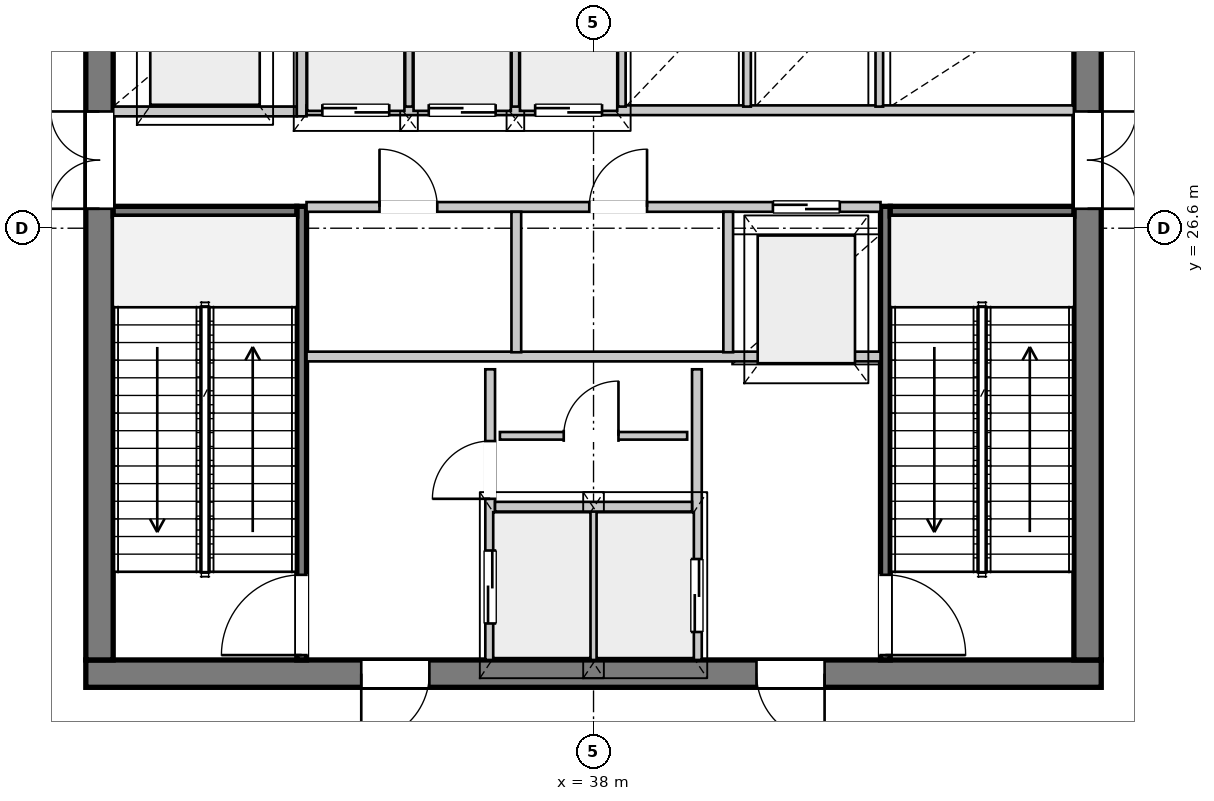
"""IFC4 building model, lengths in metres.
Left out: names, types, materials, properties, quantities, classifications, styles, units other than length and angle.
Written with IfcOpenShell. Run it as: python <this file> out.ifc"""

import sys

from ifc_helpers import new_model, si_unit, direction, frame, frame_2d, origin, place, context, subcontext, project, spatial, rectangle, extrude, source, transform, mapped, element, fill, save


model = new_model("IFC4")
c1 = context("Model", 3, precision=1e-05, world=origin(), true_north=direction((0.0, 1.0)))
c2 = subcontext(c1, "Body", "Model", "MODEL_VIEW")
j1 = project(units=[si_unit("LENGTHUNIT", "METRE"), si_unit("PLANEANGLEUNIT", "RADIAN")], contexts=[c1])
p1 = place(None, origin())
s1 = spatial("IfcSite", under=j1, at=p1, CompositionType="ELEMENT")
p2 = place(p1, origin())
s2 = spatial("IfcBuilding", under=s1, at=p2, CompositionType="ELEMENT")
p3 = place(p2, frame((0.0, 0.0, 204.3)))
s3 = spatial("IfcBuildingStorey", under=s2, at=p3, CompositionType="ELEMENT", Elevation=204.3)
p4 = place(p3, frame((52.952, 22.917, 0.0), z_axis=(0.0, 0.0, 1.0), x_axis=(-0.51363254846, -0.858010259357, 0.0)))
e1 = element("IfcWall", 1, at=p4, inside=s3, PredefinedType="SOLIDWALL", context=c2, shape_type="SweptSolid", body=[
    extrude(rectangle(XDim=23.133, YDim=0.38, at=frame_2d((11.566, 0.0))), origin(), (0.0, 0.0, 1.0), 4.572),
])
p5 = place(p3, frame((46.35, 19.275, 0.0), z_axis=(0.0, 0.0, 1.0), x_axis=(-1.0, 0.0, 0.0)))
e2 = element("IfcWall", 2, at=p5, inside=s3, PredefinedType="SHEAR", context=c2, shape_type="SweptSolid", body=[
    extrude(rectangle(XDim=16.7, YDim=0.45, at=frame_2d((8.35, 0.0))), origin(), (0.0, 0.0, 1.0), 5.08),
])
p6 = place(p5, frame((4.55, 0.0, 0.0)))
e3 = element("IfcOpeningElement", 3, at=p6, cuts=e2, PredefinedType="OPENING", context=c2, shape_type="SweptSolid", body=[
    extrude(rectangle(XDim=1.12, YDim=2.25, at=frame_2d((0.56, 1.125))), frame((0.0, 0.235, 0.0), z_axis=(0.0, -1.0, 0.0), x_axis=(1.0, 0.0, 0.0)), (0.0, 0.0, 1.0), 0.47),
])
p7 = place(p5, frame((11.05, 0.0, 0.0)))
e4 = element("IfcOpeningElement", 4, at=p7, cuts=e2, PredefinedType="OPENING", context=c2, shape_type="SweptSolid", body=[
    extrude(rectangle(XDim=1.12, YDim=2.25, at=frame_2d((0.56, 1.125))), frame((0.0, 0.235, 0.0), z_axis=(0.0, -1.0, 0.0), x_axis=(1.0, 0.0, 0.0)), (0.0, 0.0, 1.0), 0.47),
])
p8 = place(p3, frame((29.875, 19.5, 0.0), z_axis=(0.0, 0.0, 1.0), x_axis=(0.0, 1.0, 0.0)))
e5 = element("IfcWall", 5, at=p8, inside=s3, PredefinedType="SHEAR", context=c2, shape_type="SweptSolid", body=[
    extrude(rectangle(XDim=14.2, YDim=0.45, at=frame_2d((7.1, 0.0))), origin(), (0.0, 0.0, 1.0), 5.08),
])
p9 = place(p8, frame((7.42, 0.0, 0.0)))
e6 = element("IfcOpeningElement", 6, at=p9, cuts=e5, PredefinedType="OPENING", context=c2, shape_type="SweptSolid", body=[
    extrude(rectangle(XDim=1.6, YDim=2.2, at=frame_2d((0.8, 1.1))), frame((0.0, 0.235, 0.0), z_axis=(0.0, -1.0, 0.0), x_axis=(1.0, 0.0, 0.0)), (0.0, 0.0, 1.0), 0.47),
])
p10 = place(p3, frame((46.125, 33.7, 0.0), z_axis=(0.0, 0.0, 1.0), x_axis=(0.0, -1.0, 0.0)))
e7 = element("IfcWall", 7, at=p10, inside=s3, PredefinedType="SHEAR", context=c2, shape_type="SweptSolid", body=[
    extrude(rectangle(XDim=14.2, YDim=0.45, at=frame_2d((7.1, 0.0))), origin(), (0.0, 0.0, 1.0), 5.08),
])
p11 = place(p10, frame((5.18, 0.0, 0.0)))
e8 = element("IfcOpeningElement", 8, at=p11, cuts=e7, PredefinedType="OPENING", context=c2, shape_type="SweptSolid", body=[
    extrude(rectangle(XDim=1.6, YDim=2.2, at=frame_2d((0.8, 1.1))), frame((0.0, 0.235, 0.0), z_axis=(0.0, -1.0, 0.0), x_axis=(1.0, 0.0, 0.0)), (0.0, 0.0, 1.0), 0.47),
])
p12 = place(p10, frame((2.05, 0.0, 0.0)))
e9 = element("IfcOpeningElement", 9, at=p12, cuts=e7, PredefinedType="OPENING", context=c2, shape_type="SweptSolid", body=[
    extrude(rectangle(XDim=0.95, YDim=2.1, at=frame_2d((0.475, 1.05))), frame((0.0, 0.235, 0.0), z_axis=(0.0, -1.0, 0.0), x_axis=(1.0, 0.0, 0.0)), (0.0, 0.0, 1.0), 0.47),
])
p13 = place(p3, frame((33.2, 19.5, 0.0), z_axis=(0.0, 0.0, 1.0), x_axis=(0.0, 1.0, 0.0)))
e10 = element("IfcWall", 10, at=p13, inside=s3, PredefinedType="PARTITIONING", context=c2, shape_type="SweptSolid", body=[
    extrude(rectangle(XDim=7.46, YDim=0.16, at=frame_2d((3.73, 0.0))), origin(), (0.0, 0.0, 1.0), 5.08),
])
p14 = place(p13, frame((0.08, 0.0, 0.0)))
e11 = element("IfcOpeningElement", 11, at=p14, cuts=e10, PredefinedType="OPENING", context=c2, shape_type="SweptSolid", body=[
    extrude(rectangle(XDim=1.32, YDim=2.2, at=frame_2d((0.66, 1.1))), frame((0.0, 0.09, 0.0), z_axis=(0.0, -1.0, 0.0), x_axis=(1.0, 0.0, 0.0)), (0.0, 0.0, 1.0), 0.18),
])
p15 = place(p3, frame((30.1, 26.88, 0.0), z_axis=(0.0, 0.0, 1.0), x_axis=(1.0, 0.0, 0.0)))
e12 = element("IfcWall", 12, at=p15, inside=s3, PredefinedType="PARTITIONING", context=c2, shape_type="SweptSolid", body=[
    extrude(rectangle(XDim=3.02, YDim=0.16, at=frame_2d((1.51, 0.0))), origin(), (0.0, 0.0, 1.0), 5.08),
])
p16 = place(p3, frame((42.8, 26.96, 0.0), z_axis=(0.0, 0.0, 1.0), x_axis=(0.0, -1.0, 0.0)))
e13 = element("IfcWall", 13, at=p16, inside=s3, PredefinedType="PARTITIONING", context=c2, shape_type="SweptSolid", body=[
    extrude(rectangle(XDim=7.46, YDim=0.16, at=frame_2d((3.73, 0.0))), origin(), (0.0, 0.0, 1.0), 5.08),
])
p17 = place(p16, frame((6.06, 0.0, 0.0)))
e14 = element("IfcOpeningElement", 14, at=p17, cuts=e13, PredefinedType="OPENING", context=c2, shape_type="SweptSolid", body=[
    extrude(rectangle(XDim=1.32, YDim=2.2, at=frame_2d((0.66, 1.1))), frame((0.0, 0.09, 0.0), z_axis=(0.0, -1.0, 0.0), x_axis=(1.0, 0.0, 0.0)), (0.0, 0.0, 1.0), 0.18),
])
p18 = place(p3, frame((42.88, 26.88, 0.0), z_axis=(0.0, 0.0, 1.0), x_axis=(1.0, 0.0, 0.0)))
e15 = element("IfcWall", 15, at=p18, inside=s3, PredefinedType="PARTITIONING", context=c2, shape_type="SweptSolid", body=[
    extrude(rectangle(XDim=3.02, YDim=0.16, at=frame_2d((1.51, 0.0))), origin(), (0.0, 0.0, 1.0), 5.08),
])
p19 = place(p3, frame((36.3, 19.5, 0.0), z_axis=(0.0, 0.0, 1.0), x_axis=(0.0, 1.0, 0.0)))
e16 = element("IfcWall", 16, at=p19, inside=s3, PredefinedType="PARTITIONING", context=c2, shape_type="SweptSolid", body=[
    extrude(rectangle(XDim=4.78, YDim=0.16, at=frame_2d((2.39, 0.0))), origin(), (0.0, 0.0, 1.0), 5.08),
])
p20 = place(p19, frame((0.6, 0.0, 0.0)))
e17 = element("IfcOpeningElement", 17, at=p20, cuts=e16, PredefinedType="OPENING", context=c2, shape_type="SweptSolid", body=[
    extrude(rectangle(XDim=1.2, YDim=2.2, at=frame_2d((0.6, 1.1))), frame((0.0, 0.09, 0.0), z_axis=(0.0, -1.0, 0.0), x_axis=(1.0, 0.0, 0.0)), (0.0, 0.0, 1.0), 0.18),
])
p21 = place(p19, frame((2.65, 0.0, 0.0)))
e18 = element("IfcOpeningElement", 18, at=p21, cuts=e16, PredefinedType="OPENING", context=c2, shape_type="SweptSolid", body=[
    extrude(rectangle(XDim=0.95, YDim=2.1, at=frame_2d((0.475, 1.05))), frame((0.0, 0.09, 0.0), z_axis=(0.0, -1.0, 0.0), x_axis=(1.0, 0.0, 0.0)), (0.0, 0.0, 1.0), 0.18),
])
p22 = place(p3, frame((39.7, 24.28, 0.0), z_axis=(0.0, 0.0, 1.0), x_axis=(0.0, -1.0, 0.0)))
e19 = element("IfcWall", 19, at=p22, inside=s3, PredefinedType="PARTITIONING", context=c2, shape_type="SweptSolid", body=[
    extrude(rectangle(XDim=4.78, YDim=0.16, at=frame_2d((2.39, 0.0))), origin(), (0.0, 0.0, 1.0), 5.08),
])
p23 = place(p22, frame((3.12, 0.0, 0.0)))
e20 = element("IfcOpeningElement", 20, at=p23, cuts=e19, PredefinedType="OPENING", context=c2, shape_type="SweptSolid", body=[
    extrude(rectangle(XDim=1.2, YDim=2.2, at=frame_2d((0.6, 1.1))), frame((0.0, 0.09, 0.0), z_axis=(0.0, -1.0, 0.0), x_axis=(1.0, 0.0, 0.0)), (0.0, 0.0, 1.0), 0.18),
])
p24 = place(p3, frame((38.0, 19.5, 0.0), z_axis=(0.0, 0.0, 1.0), x_axis=(0.0, 1.0, 0.0)))
e21 = element("IfcWall", 21, at=p24, inside=s3, PredefinedType="PARTITIONING", context=c2, shape_type="SweptSolid", body=[
    extrude(rectangle(XDim=2.46, YDim=0.125, at=frame_2d((1.23, 0.0))), origin(), (0.0, 0.0, 1.0), 5.08),
])
p25 = place(p3, frame((36.38, 22.02, 0.0), z_axis=(0.0, 0.0, 1.0), x_axis=(1.0, 0.0, 0.0)))
e22 = element("IfcWall", 22, at=p25, inside=s3, PredefinedType="PARTITIONING", context=c2, shape_type="SweptSolid", body=[
    extrude(rectangle(XDim=3.24, YDim=0.16, at=frame_2d((1.62, 0.0))), origin(), (0.0, 0.0, 1.0), 5.08),
])
p26 = place(p3, frame((33.28, 24.49, 0.0), z_axis=(0.0, 0.0, 1.0), x_axis=(1.0, 0.0, 0.0)))
e23 = element("IfcWall", 23, at=p26, inside=s3, PredefinedType="PARTITIONING", context=c2, shape_type="SweptSolid", body=[
    extrude(rectangle(XDim=9.44, YDim=0.16, at=frame_2d((4.72, 0.0))), origin(), (0.0, 0.0, 1.0), 5.08),
])
p27 = place(p3, frame((36.46, 23.186, 0.0), z_axis=(0.0, 0.0, 1.0), x_axis=(1.0, 0.0, 0.0)))
e24 = element("IfcWall", 24, at=p27, inside=s3, PredefinedType="PARTITIONING", context=c2, shape_type="SweptSolid", body=[
    extrude(rectangle(XDim=3.08, YDim=0.125, at=frame_2d((1.54, 0.0))), origin(), (0.0, 0.0, 1.0), 5.08),
])
p28 = place(p27, frame((1.05, 0.0, 0.0)))
e25 = element("IfcOpeningElement", 25, at=p28, cuts=e24, PredefinedType="OPENING", context=c2, shape_type="SweptSolid", body=[
    extrude(rectangle(XDim=0.9, YDim=2.1, at=frame_2d((0.45, 1.05))), frame((0.0, 0.073, 0.0), z_axis=(0.0, -1.0, 0.0), x_axis=(1.0, 0.0, 0.0)), (0.0, 0.0, 1.0), 0.145),
])
p29 = place(p3, frame((30.1, 28.52, 0.0), z_axis=(0.0, 0.0, 1.0), x_axis=(1.0, 0.0, 0.0)))
e26 = element("IfcWall", 26, at=p29, inside=s3, PredefinedType="PARTITIONING", context=c2, shape_type="SweptSolid", body=[
    extrude(rectangle(XDim=3.02, YDim=0.16, at=frame_2d((1.51, 0.0))), origin(), (0.0, 0.0, 1.0), 5.08),
])
p30 = place(p3, frame((33.2, 28.44, 0.0), z_axis=(0.0, 0.0, 1.0), x_axis=(0.0, 1.0, 0.0)))
e27 = element("IfcWall", 27, at=p30, inside=s3, PredefinedType="PARTITIONING", context=c2, shape_type="SweptSolid", body=[
    extrude(rectangle(XDim=5.26, YDim=0.16, at=frame_2d((2.63, 0.0))), origin(), (0.0, 0.0, 1.0), 5.08),
])
p31 = place(p3, frame((33.28, 26.95, 0.0), z_axis=(0.0, 0.0, 1.0), x_axis=(1.0, 0.0, 0.0)))
e28 = element("IfcWall", 28, at=p31, inside=s3, PredefinedType="PARTITIONING", context=c2, shape_type="SweptSolid", body=[
    extrude(rectangle(XDim=9.44, YDim=0.16, at=frame_2d((4.72, 0.0))), origin(), (0.0, 0.0, 1.0), 5.08),
])
p32 = place(p31, frame((1.2, 0.0, 0.0)))
e29 = element("IfcOpeningElement", 29, at=p32, cuts=e28, PredefinedType="OPENING", context=c2, shape_type="SweptSolid", body=[
    extrude(rectangle(XDim=0.95, YDim=2.1, at=frame_2d((0.475, 1.05))), frame((0.0, 0.09, 0.0), z_axis=(0.0, -1.0, 0.0), x_axis=(1.0, 0.0, 0.0)), (0.0, 0.0, 1.0), 0.18),
])
p33 = place(p31, frame((4.65, 0.0, 0.0)))
e30 = element("IfcOpeningElement", 30, at=p33, cuts=e28, PredefinedType="OPENING", context=c2, shape_type="SweptSolid", body=[
    extrude(rectangle(XDim=0.95, YDim=2.1, at=frame_2d((0.475, 1.05))), frame((0.0, 0.09, 0.0), z_axis=(0.0, -1.0, 0.0), x_axis=(1.0, 0.0, 0.0)), (0.0, 0.0, 1.0), 0.18),
])
p34 = place(p31, frame((7.67, 0.0, 0.0)))
e31 = element("IfcOpeningElement", 31, at=p34, cuts=e28, PredefinedType="OPENING", context=c2, shape_type="SweptSolid", body=[
    extrude(rectangle(XDim=1.1, YDim=2.2, at=frame_2d((0.55, 1.1))), frame((0.0, 0.09, 0.0), z_axis=(0.0, -1.0, 0.0), x_axis=(1.0, 0.0, 0.0)), (0.0, 0.0, 1.0), 0.18),
])
for number, where, z_axis, x_axis in (
    (32, (36.73, 24.56, 0.0), (0.0, 0.0, 1.0), (0.0, 1.0, 0.0)),
    (33, (40.215, 24.56, 0.0), (0.0, 0.0, 1.0), (0.0, 1.0, 0.0)),
):
    element("IfcWall", number, at=place(p3, frame(where, z_axis=z_axis, x_axis=x_axis)), inside=s3, PredefinedType="PARTITIONING", context=c2, shape_type="SweptSolid", body=[
        extrude(rectangle(XDim=2.31, YDim=0.16, at=frame_2d((1.155, 0.0))), origin(), (0.0, 0.0, 1.0), 5.08),
    ])
p35 = place(p3, frame((33.28, 28.54, 0.0), z_axis=(0.0, 0.0, 1.0), x_axis=(1.0, 0.0, 0.0)))
e34 = element("IfcWall", 34, at=p35, inside=s3, PredefinedType="PARTITIONING", context=c2, shape_type="SweptSolid", body=[
    extrude(rectangle(XDim=12.62, YDim=0.16, at=frame_2d((6.31, 0.0))), origin(), (0.0, 0.0, 1.0), 5.08),
])
p36 = place(p35, frame((0.26, 0.0, 0.0)))
e35 = element("IfcOpeningElement", 35, at=p36, cuts=e34, PredefinedType="OPENING", context=c2, shape_type="SweptSolid", body=[
    extrude(rectangle(XDim=1.1, YDim=2.2, at=frame_2d((0.55, 1.1))), frame((0.0, 0.09, 0.0), z_axis=(0.0, -1.0, 0.0), x_axis=(1.0, 0.0, 0.0)), (0.0, 0.0, 1.0), 0.18),
])
p37 = place(p35, frame((2.01, 0.0, 0.0)))
e36 = element("IfcOpeningElement", 36, at=p37, cuts=e34, PredefinedType="OPENING", context=c2, shape_type="SweptSolid", body=[
    extrude(rectangle(XDim=1.1, YDim=2.2, at=frame_2d((0.55, 1.1))), frame((0.0, 0.09, 0.0), z_axis=(0.0, -1.0, 0.0), x_axis=(1.0, 0.0, 0.0)), (0.0, 0.0, 1.0), 0.18),
])
p38 = place(p35, frame((3.76, 0.0, 0.0)))
e37 = element("IfcOpeningElement", 37, at=p38, cuts=e34, PredefinedType="OPENING", context=c2, shape_type="SweptSolid", body=[
    extrude(rectangle(XDim=1.1, YDim=2.2, at=frame_2d((0.55, 1.1))), frame((0.0, 0.09, 0.0), z_axis=(0.0, -1.0, 0.0), x_axis=(1.0, 0.0, 0.0)), (0.0, 0.0, 1.0), 0.18),
])
for number, where, z_axis, x_axis in (
    (38, (34.965, 28.6, 0.0), (0.0, 0.0, 1.0), (0.0, 1.0, 0.0)),
    (39, (36.715, 28.6, 0.0), (0.0, 0.0, 1.0), (0.0, 1.0, 0.0)),
    (40, (38.465, 28.6, 0.0), (0.0, 0.0, 1.0), (0.0, 1.0, 0.0)),
    (41, (40.525, 28.6, 0.0), (0.0, 0.0, 1.0), (0.0, 1.0, 0.0)),
    (42, (42.7, 28.6, 0.0), (0.0, 0.0, 1.0), (0.0, 1.0, 0.0)),
):
    element("IfcWall", number, at=place(p3, frame(where, z_axis=z_axis, x_axis=x_axis)), inside=s3, PredefinedType="PARTITIONING", context=c2, shape_type="SweptSolid", body=[
        extrude(rectangle(XDim=1.92, YDim=0.125, at=frame_2d((0.96, 0.0))), origin(), (0.0, 0.0, 1.0), 5.08),
    ])
m1 = source(origin(), c2, "Body", "SweptSolid", [
    extrude(rectangle(XDim=1.12, YDim=2.25, at=frame_2d((0.56, 1.125))), frame((0.0, 0.025, 0.0), z_axis=(0.0, -1.0, 0.0), x_axis=(1.0, 0.0, 0.0)), (0.0, 0.0, 1.0), 0.05),
])
p39 = place(p6, origin())
e43 = element("IfcDoor", 43, at=p39, inside=s3, OperationType="SINGLE_SWING_LEFT", PredefinedType="DOOR", context=c2, shape_type="MappedRepresentation", body=[
    mapped(m1, transform((0.0, 0.0, 0.0), x_axis=(1.0, 0.0, 0.0), y_axis=(0.0, 1.0, 0.0), z_axis=(0.0, 0.0, 1.0), scale=1.0)),
])
fill(e3, e43)
p40 = place(p7, origin())
e44 = element("IfcDoor", 44, at=p40, inside=s3, OperationType="SINGLE_SWING_RIGHT", PredefinedType="DOOR", context=c2, shape_type="MappedRepresentation", body=[
    mapped(m1, transform((0.0, 0.0, 0.0), x_axis=(1.0, 0.0, 0.0), y_axis=(0.0, 1.0, 0.0), z_axis=(0.0, 0.0, 1.0), scale=1.0)),
])
fill(e4, e44)
m2 = source(origin(), c2, "Body", "SweptSolid", [
    extrude(rectangle(XDim=1.6, YDim=2.2, at=frame_2d((0.8, 1.1))), frame((0.0, 0.025, 0.0), z_axis=(0.0, -1.0, 0.0), x_axis=(1.0, 0.0, 0.0)), (0.0, 0.0, 1.0), 0.05),
])
p41 = place(p9, origin())
e45 = element("IfcDoor", 45, at=p41, inside=s3, OperationType="DOUBLE_DOOR_SINGLE_SWING", PredefinedType="DOOR", context=c2, shape_type="MappedRepresentation", body=[
    mapped(m2, transform((0.0, 0.0, 0.0), x_axis=(1.0, 0.0, 0.0), y_axis=(0.0, 1.0, 0.0), z_axis=(0.0, 0.0, 1.0), scale=1.0)),
])
fill(e6, e45)
p42 = place(p11, origin())
e46 = element("IfcDoor", 46, at=p42, inside=s3, OperationType="DOUBLE_DOOR_SINGLE_SWING", PredefinedType="DOOR", context=c2, shape_type="MappedRepresentation", body=[
    mapped(m2, transform((0.0, 0.0, 0.0), x_axis=(1.0, 0.0, 0.0), y_axis=(0.0, 1.0, 0.0), z_axis=(0.0, 0.0, 1.0), scale=1.0)),
])
fill(e8, e46)
m3 = source(origin(), c2, "Body", "SweptSolid", [
    extrude(rectangle(XDim=1.32, YDim=2.2, at=frame_2d((0.66, 1.1))), frame((0.0, 0.025, 0.0), z_axis=(0.0, -1.0, 0.0), x_axis=(1.0, 0.0, 0.0)), (0.0, 0.0, 1.0), 0.05),
])
p43 = place(p14, origin())
e47 = element("IfcDoor", 47, at=p43, inside=s3, OperationType="SINGLE_SWING_LEFT", PredefinedType="DOOR", context=c2, shape_type="MappedRepresentation", body=[
    mapped(m3, transform((0.0, 0.0, 0.0), x_axis=(1.0, 0.0, 0.0), y_axis=(0.0, 1.0, 0.0), z_axis=(0.0, 0.0, 1.0), scale=1.0)),
])
fill(e11, e47)
p44 = place(p17, origin())
e48 = element("IfcDoor", 48, at=p44, inside=s3, OperationType="SINGLE_SWING_RIGHT", PredefinedType="DOOR", context=c2, shape_type="MappedRepresentation", body=[
    mapped(m3, transform((0.0, 0.0, 0.0), x_axis=(1.0, 0.0, 0.0), y_axis=(0.0, 1.0, 0.0), z_axis=(0.0, 0.0, 1.0), scale=1.0)),
])
fill(e14, e48)
m4 = source(origin(), c2, "Body", "SweptSolid", [
    extrude(rectangle(XDim=1.2, YDim=2.2, at=frame_2d((0.6, 1.1))), frame((0.0, 0.025, 0.0), z_axis=(0.0, -1.0, 0.0), x_axis=(1.0, 0.0, 0.0)), (0.0, 0.0, 1.0), 0.05),
])
p45 = place(p20, origin())
e49 = element("IfcDoor", 49, at=p45, inside=s3, OperationType="DOUBLE_DOOR_SLIDING", PredefinedType="DOOR", context=c2, shape_type="MappedRepresentation", body=[
    mapped(m4, transform((0.0, 0.0, 0.0), x_axis=(1.0, 0.0, 0.0), y_axis=(0.0, 1.0, 0.0), z_axis=(0.0, 0.0, 1.0), scale=1.0)),
])
fill(e17, e49)
m5 = source(origin(), c2, "Body", "SweptSolid", [
    extrude(rectangle(XDim=0.95, YDim=2.1, at=frame_2d((0.475, 1.05))), frame((0.0, 0.025, 0.0), z_axis=(0.0, -1.0, 0.0), x_axis=(1.0, 0.0, 0.0)), (0.0, 0.0, 1.0), 0.05),
])
p46 = place(p21, origin())
e50 = element("IfcDoor", 50, at=p46, inside=s3, OperationType="SINGLE_SWING_LEFT", PredefinedType="DOOR", context=c2, shape_type="MappedRepresentation", body=[
    mapped(m5, transform((0.0, 0.0, 0.0), x_axis=(1.0, 0.0, 0.0), y_axis=(0.0, 1.0, 0.0), z_axis=(0.0, 0.0, 1.0), scale=1.0)),
])
fill(e18, e50)
m6 = source(origin(), c2, "Body", "SweptSolid", [
    extrude(rectangle(XDim=0.9, YDim=2.1, at=frame_2d((0.45, 1.05))), frame((0.0, 0.025, 0.0), z_axis=(0.0, -1.0, 0.0), x_axis=(1.0, 0.0, 0.0)), (0.0, 0.0, 1.0), 0.05),
])
p47 = place(p28, origin())
e51 = element("IfcDoor", 51, at=p47, inside=s3, OperationType="SINGLE_SWING_RIGHT", PredefinedType="DOOR", context=c2, shape_type="MappedRepresentation", body=[
    mapped(m6, transform((0.0, 0.0, 0.0), x_axis=(1.0, 0.0, 0.0), y_axis=(0.0, 1.0, 0.0), z_axis=(0.0, 0.0, 1.0), scale=1.0)),
])
fill(e25, e51)
p48 = place(p23, origin())
e52 = element("IfcDoor", 52, at=p48, inside=s3, OperationType="DOUBLE_DOOR_SLIDING", PredefinedType="DOOR", context=c2, shape_type="MappedRepresentation", body=[
    mapped(m4, transform((0.0, 0.0, 0.0), x_axis=(1.0, 0.0, 0.0), y_axis=(0.0, 1.0, 0.0), z_axis=(0.0, 0.0, 1.0), scale=1.0)),
])
fill(e20, e52)
p49 = place(p32, origin())
e53 = element("IfcDoor", 53, at=p49, inside=s3, OperationType="SINGLE_SWING_LEFT", PredefinedType="DOOR", context=c2, shape_type="MappedRepresentation", body=[
    mapped(m5, transform((0.0, 0.0, 0.0), x_axis=(1.0, 0.0, 0.0), y_axis=(0.0, 1.0, 0.0), z_axis=(0.0, 0.0, 1.0), scale=1.0)),
])
fill(e29, e53)
p50 = place(p33, origin())
e54 = element("IfcDoor", 54, at=p50, inside=s3, OperationType="SINGLE_SWING_RIGHT", PredefinedType="DOOR", context=c2, shape_type="MappedRepresentation", body=[
    mapped(m5, transform((0.0, 0.0, 0.0), x_axis=(1.0, 0.0, 0.0), y_axis=(0.0, 1.0, 0.0), z_axis=(0.0, 0.0, 1.0), scale=1.0)),
])
fill(e30, e54)
m7 = source(origin(), c2, "Body", "SweptSolid", [
    extrude(rectangle(XDim=1.1, YDim=2.2, at=frame_2d((0.55, 1.1))), frame((0.0, 0.025, 0.0), z_axis=(0.0, -1.0, 0.0), x_axis=(1.0, 0.0, 0.0)), (0.0, 0.0, 1.0), 0.05),
])
p51 = place(p34, origin())
e55 = element("IfcDoor", 55, at=p51, inside=s3, OperationType="DOUBLE_DOOR_SLIDING", PredefinedType="DOOR", context=c2, shape_type="MappedRepresentation", body=[
    mapped(m7, transform((0.0, 0.0, 0.0), x_axis=(1.0, 0.0, 0.0), y_axis=(0.0, 1.0, 0.0), z_axis=(0.0, 0.0, 1.0), scale=1.0)),
])
fill(e31, e55)
p52 = place(p36, origin())
e56 = element("IfcDoor", 56, at=p52, inside=s3, OperationType="DOUBLE_DOOR_SLIDING", PredefinedType="DOOR", context=c2, shape_type="MappedRepresentation", body=[
    mapped(m7, transform((0.0, 0.0, 0.0), x_axis=(1.0, 0.0, 0.0), y_axis=(0.0, 1.0, 0.0), z_axis=(0.0, 0.0, 1.0), scale=1.0)),
])
fill(e35, e56)
p53 = place(p37, origin())
e57 = element("IfcDoor", 57, at=p53, inside=s3, OperationType="DOUBLE_DOOR_SLIDING", PredefinedType="DOOR", context=c2, shape_type="MappedRepresentation", body=[
    mapped(m7, transform((0.0, 0.0, 0.0), x_axis=(1.0, 0.0, 0.0), y_axis=(0.0, 1.0, 0.0), z_axis=(0.0, 0.0, 1.0), scale=1.0)),
])
fill(e36, e57)
p54 = place(p38, origin())
e58 = element("IfcDoor", 58, at=p54, inside=s3, OperationType="DOUBLE_DOOR_SLIDING", PredefinedType="DOOR", context=c2, shape_type="MappedRepresentation", body=[
    mapped(m7, transform((0.0, 0.0, 0.0), x_axis=(1.0, 0.0, 0.0), y_axis=(0.0, 1.0, 0.0), z_axis=(0.0, 0.0, 1.0), scale=1.0)),
])
fill(e37, e58)
save(model, sys.argv[1])
